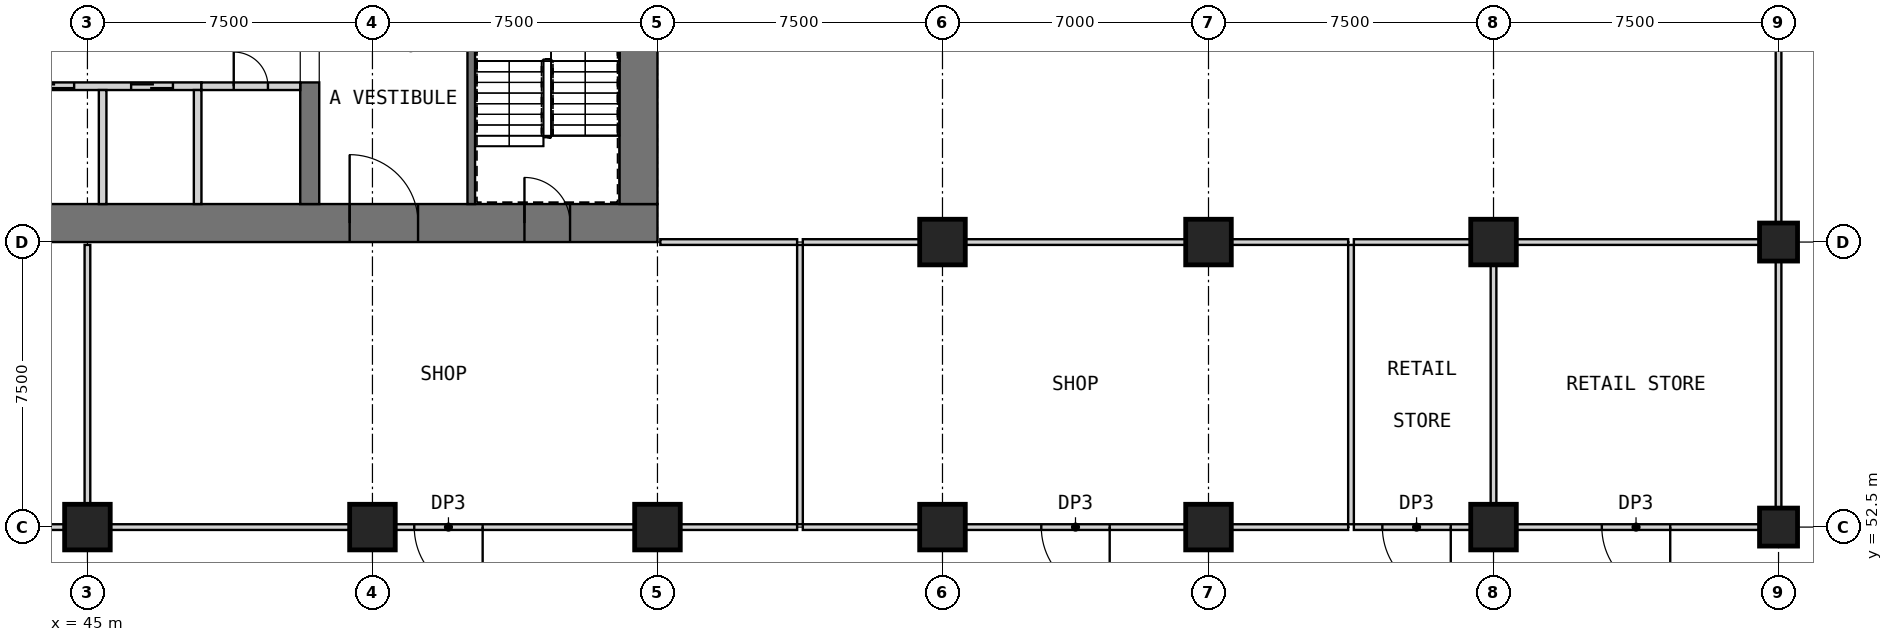
"""IFC4 building model, lengths in metres.
Left out: names, types, materials, properties, quantities, classifications, styles, units other than length and angle.
Written with IfcOpenShell. Run it as: python <this file> out.ifc"""

import sys

from ifc_helpers import new_model, si_unit, direction, frame, frame_2d, origin, origin_2d, place, context, subcontext, project, spatial, rectangle, extrude, element, fill, save


model = new_model("IFC4")
c1 = context("Model", 3, precision=1e-05, world=origin(), true_north=direction((0.0, 1.0)))
c2 = subcontext(c1, "Body", "Model", "MODEL_VIEW")
j1 = project(units=[si_unit("LENGTHUNIT", "METRE"), si_unit("PLANEANGLEUNIT", "RADIAN")], contexts=[c1])
p1 = place(None, origin())
s1 = spatial("IfcSite", under=j1, at=p1, CompositionType="ELEMENT")
p2 = place(p1, origin())
s2 = spatial("IfcBuilding", under=s1, at=p2, CompositionType="ELEMENT")
p3 = place(p2, frame((0.0, 0.0, 13.5)))
s3 = spatial("IfcBuildingStorey", under=s2, at=p3, CompositionType="ELEMENT", Elevation=13.5)
for number, where, z_axis, x_axis in (
    (1, (45.0, 52.5, 0.0), (0.0, 0.0, 1.0), (1.0, 0.0, 0.0)),
    (2, (52.5, 52.5, 0.0), (0.0, 0.0, 1.0), (1.0, 0.0, 0.0)),
    (3, (60.0, 52.5, 0.0), (0.0, 0.0, 1.0), (1.0, 0.0, 0.0)),
    (4, (67.5, 52.5, 0.0), (0.0, 0.0, 1.0), (1.0, 0.0, 0.0)),
    (5, (67.5, 60.0, 0.0), (0.0, 0.0, 1.0), (1.0, 0.0, 0.0)),
    (6, (74.5, 52.5, 0.0), (0.0, 0.0, 1.0), (1.0, 0.0, 0.0)),
    (7, (74.5, 60.0, 0.0), (0.0, 0.0, 1.0), (1.0, 0.0, 0.0)),
    (8, (82.0, 52.5, 0.0), (0.0, 0.0, 1.0), (1.0, 0.0, 0.0)),
    (9, (82.0, 60.0, 0.0), (0.0, 0.0, 1.0), (1.0, 0.0, 0.0)),
):
    element("IfcColumn", number, at=place(p3, frame(where, z_axis=z_axis, x_axis=x_axis)), inside=s3, PredefinedType="COLUMN", context=c2, shape_type="SweptSolid", body=[
        extrude(rectangle(XDim=1.2, YDim=1.2, at=origin_2d()), origin(), (0.0, 0.0, 1.0), 5.0),
    ])
for number, where, z_axis, x_axis in (
    (10, (89.5, 52.5, 0.0), (0.0, 0.0, 1.0), (1.0, 0.0, 0.0)),
    (11, (89.5, 60.0, 0.0), (0.0, 0.0, 1.0), (1.0, 0.0, 0.0)),
):
    element("IfcColumn", number, at=place(p3, frame(where, z_axis=z_axis, x_axis=x_axis)), inside=s3, PredefinedType="COLUMN", context=c2, shape_type="SweptSolid", body=[
        extrude(rectangle(XDim=1.0, YDim=1.0, at=origin_2d()), origin(), (0.0, 0.0, 1.0), 5.0),
    ])
p4 = place(p3, frame((30.0, 60.5, 0.0), z_axis=(0.0, 0.0, 1.0), x_axis=(1.0, 0.0, 0.0)))
e12 = element("IfcWall", 12, at=p4, inside=s3, PredefinedType="SHEAR", context=c2, shape_type="SweptSolid", body=[
    extrude(rectangle(XDim=30.0, YDim=1.0, at=frame_2d((15.0, 0.0))), origin(), (0.0, 0.0, 1.0), 5.0),
])
p5 = place(p4, frame((21.9, 0.0, 0.0)))
e13 = element("IfcOpeningElement", 13, at=p5, cuts=e12, PredefinedType="OPENING", context=c2, shape_type="SweptSolid", body=[
    extrude(rectangle(XDim=1.8, YDim=2.1, at=frame_2d((0.9, 1.05))), frame((0.0, 0.51, 0.0), z_axis=(0.0, -1.0, 0.0), x_axis=(1.0, 0.0, 0.0)), (0.0, 0.0, 1.0), 1.02),
])
p6 = place(p4, frame((26.5, 0.0, 0.0)))
e14 = element("IfcOpeningElement", 14, at=p6, cuts=e12, PredefinedType="OPENING", context=c2, shape_type="SweptSolid", body=[
    extrude(rectangle(XDim=1.2, YDim=2.1, at=frame_2d((0.6, 1.05))), frame((0.0, 0.51, 0.0), z_axis=(0.0, -1.0, 0.0), x_axis=(1.0, 0.0, 0.0)), (0.0, 0.0, 1.0), 1.02),
])
p7 = place(p3, frame((59.5, 61.0, 0.0), z_axis=(0.0, 0.0, 1.0), x_axis=(0.0, 1.0, 0.0)))
e15 = element("IfcWall", 15, at=p7, inside=s3, PredefinedType="SHEAR", context=c2, shape_type="SweptSolid", body=[
    extrude(rectangle(XDim=20.5, YDim=1.0, at=frame_2d((10.25, 0.0))), origin(), (0.0, 0.0, 1.0), 5.0),
])
p8 = place(p7, frame((14.5, 0.0, 0.0)))
e16 = element("IfcOpeningElement", 16, at=p8, cuts=e15, PredefinedType="OPENING", context=c2, shape_type="SweptSolid", body=[
    extrude(rectangle(XDim=1.8, YDim=2.1, at=frame_2d((0.9, 1.05))), frame((0.0, 0.51, 0.0), z_axis=(0.0, -1.0, 0.0), x_axis=(1.0, 0.0, 0.0)), (0.0, 0.0, 1.0), 1.02),
])
p9 = place(p3, frame((50.85, 61.0, 0.0), z_axis=(0.0, 0.0, 1.0), x_axis=(0.0, 1.0, 0.0)))
e17 = element("IfcWall", 17, at=p9, inside=s3, PredefinedType="SHEAR", context=c2, shape_type="SweptSolid", body=[
    extrude(rectangle(XDim=3.2, YDim=0.5, at=frame_2d((1.6, 0.0))), origin(), (0.0, 0.0, 1.0), 5.0),
])
p10 = place(p3, frame((35.0, 64.1, 0.0), z_axis=(0.0, 0.0, 1.0), x_axis=(1.0, 0.0, 0.0)))
e18 = element("IfcWall", 18, at=p10, inside=s3, PredefinedType="SOLIDWALL", context=c2, shape_type="SweptSolid", body=[
    extrude(rectangle(XDim=13.0, YDim=0.2, at=frame_2d((6.5, 0.0))), origin(), (0.0, 0.0, 1.0), 5.0),
])
p11 = place(p10, frame((0.75, 0.0, 0.0)))
e19 = element("IfcOpeningElement", 19, at=p11, cuts=e18, PredefinedType="OPENING", context=c2, shape_type="SweptSolid", body=[
    extrude(rectangle(XDim=1.1, YDim=2.1, at=frame_2d((0.55, 1.05))), frame((0.0, 0.11, 0.0), z_axis=(0.0, -1.0, 0.0), x_axis=(1.0, 0.0, 0.0)), (0.0, 0.0, 1.0), 0.22),
])
p12 = place(p10, frame((3.35, 0.0, 0.0)))
e20 = element("IfcOpeningElement", 20, at=p12, cuts=e18, PredefinedType="OPENING", context=c2, shape_type="SweptSolid", body=[
    extrude(rectangle(XDim=1.1, YDim=2.1, at=frame_2d((0.55, 1.05))), frame((0.0, 0.11, 0.0), z_axis=(0.0, -1.0, 0.0), x_axis=(1.0, 0.0, 0.0)), (0.0, 0.0, 1.0), 0.22),
])
p13 = place(p10, frame((5.95, 0.0, 0.0)))
e21 = element("IfcOpeningElement", 21, at=p13, cuts=e18, PredefinedType="OPENING", context=c2, shape_type="SweptSolid", body=[
    extrude(rectangle(XDim=1.1, YDim=2.1, at=frame_2d((0.55, 1.05))), frame((0.0, 0.11, 0.0), z_axis=(0.0, -1.0, 0.0), x_axis=(1.0, 0.0, 0.0)), (0.0, 0.0, 1.0), 0.22),
])
p14 = place(p10, frame((8.55, 0.0, 0.0)))
e22 = element("IfcOpeningElement", 22, at=p14, cuts=e18, PredefinedType="OPENING", context=c2, shape_type="SweptSolid", body=[
    extrude(rectangle(XDim=1.1, YDim=2.1, at=frame_2d((0.55, 1.05))), frame((0.0, 0.11, 0.0), z_axis=(0.0, -1.0, 0.0), x_axis=(1.0, 0.0, 0.0)), (0.0, 0.0, 1.0), 0.22),
])
p15 = place(p10, frame((11.15, 0.0, 0.0)))
e23 = element("IfcOpeningElement", 23, at=p15, cuts=e18, PredefinedType="OPENING", context=c2, shape_type="SweptSolid", body=[
    extrude(rectangle(XDim=1.1, YDim=2.1, at=frame_2d((0.55, 1.05))), frame((0.0, 0.11, 0.0), z_axis=(0.0, -1.0, 0.0), x_axis=(1.0, 0.0, 0.0)), (0.0, 0.0, 1.0), 0.22),
])
for number, where, z_axis, x_axis in (
    (24, (45.4, 61.0, 0.0), (0.0, 0.0, 1.0), (0.0, 1.0, 0.0)),
    (25, (47.9, 61.0, 0.0), (0.0, 0.0, 1.0), (0.0, 1.0, 0.0)),
):
    element("IfcWall", number, at=place(p3, frame(where, z_axis=z_axis, x_axis=x_axis)), inside=s3, PredefinedType="SOLIDWALL", context=c2, shape_type="SweptSolid", body=[
        extrude(rectangle(XDim=3.0, YDim=0.2, at=frame_2d((1.5, 0.0))), origin(), (0.0, 0.0, 1.0), 5.0),
    ])
p16 = place(p3, frame((48.0, 64.1, 0.0), z_axis=(0.0, 0.0, 1.0), x_axis=(1.0, 0.0, 0.0)))
e26 = element("IfcWall", 26, at=p16, inside=s3, PredefinedType="PARTITIONING", context=c2, shape_type="SweptSolid", body=[
    extrude(rectangle(XDim=2.6, YDim=0.2, at=frame_2d((1.3, 0.0))), origin(), (0.0, 0.0, 1.0), 4.7),
])
p17 = place(p16, frame((0.85, 0.0, 0.0)))
e27 = element("IfcOpeningElement", 27, at=p17, cuts=e26, PredefinedType="OPENING", context=c2, shape_type="SweptSolid", body=[
    extrude(rectangle(XDim=0.9, YDim=2.1, at=frame_2d((0.45, 1.05))), frame((0.0, 0.11, 0.0), z_axis=(0.0, -1.0, 0.0), x_axis=(1.0, 0.0, 0.0)), (0.0, 0.0, 1.0), 0.22),
])
p18 = place(p3, frame((55.1, 61.0, 0.0), z_axis=(0.0, 0.0, 1.0), x_axis=(0.0, 1.0, 0.0)))
e28 = element("IfcWall", 28, at=p18, inside=s3, PredefinedType="SOLIDWALL", context=c2, shape_type="SweptSolid", body=[
    extrude(rectangle(XDim=7.6, YDim=0.2, at=frame_2d((3.8, 0.0))), origin(), (0.0, 0.0, 1.0), 4.7),
])
p19 = place(p3, frame((44.4, 52.5, 0.0), z_axis=(0.0, 0.0, 1.0), x_axis=(-1.0, 0.0, 0.0)))
e29 = element("IfcWall", 29, at=p19, inside=s3, PredefinedType="PARTITIONING", context=c2, shape_type="SweptSolid", body=[
    extrude(rectangle(XDim=6.3, YDim=0.15, at=frame_2d((3.15, 0.0))), origin(), (0.0, 0.0, 1.0), 4.7),
])
p20 = place(p19, frame((2.25, 0.0, 0.0)))
e30 = element("IfcOpeningElement", 30, at=p20, cuts=e29, PredefinedType="OPENING", context=c2, shape_type="SweptSolid", body=[
    extrude(rectangle(XDim=1.8, YDim=2.4, at=frame_2d((0.9, 1.2))), frame((0.0, 0.085, 0.0), z_axis=(0.0, -1.0, 0.0), x_axis=(1.0, 0.0, 0.0)), (0.0, 0.0, 1.0), 0.17),
])
p21 = place(p3, frame((45.6, 52.5, 0.0), z_axis=(0.0, 0.0, 1.0), x_axis=(1.0, 0.0, 0.0)))
e31 = element("IfcWall", 31, at=p21, inside=s3, PredefinedType="PARTITIONING", context=c2, shape_type="SweptSolid", body=[
    extrude(rectangle(XDim=6.3, YDim=0.15, at=frame_2d((3.15, 0.0))), origin(), (0.0, 0.0, 1.0), 4.7),
])
p22 = place(p3, frame((59.4, 52.5, 0.0), z_axis=(0.0, 0.0, 1.0), x_axis=(-1.0, 0.0, 0.0)))
e32 = element("IfcWall", 32, at=p22, inside=s3, PredefinedType="PARTITIONING", context=c2, shape_type="SweptSolid", body=[
    extrude(rectangle(XDim=6.3, YDim=0.15, at=frame_2d((3.15, 0.0))), origin(), (0.0, 0.0, 1.0), 4.7),
])
p23 = place(p22, frame((4.0, 0.0, 0.0)))
e33 = element("IfcOpeningElement", 33, at=p23, cuts=e32, PredefinedType="OPENING", context=c2, shape_type="SweptSolid", body=[
    extrude(rectangle(XDim=1.8, YDim=2.4, at=frame_2d((0.9, 1.2))), frame((0.0, 0.085, 0.0), z_axis=(0.0, -1.0, 0.0), x_axis=(1.0, 0.0, 0.0)), (0.0, 0.0, 1.0), 0.17),
])
for number, where, z_axis, x_axis in (
    (34, (60.6, 52.5, 0.0), (0.0, 0.0, 1.0), (1.0, 0.0, 0.0)),
    (35, (63.825, 52.5, 0.0), (0.0, 0.0, 1.0), (1.0, 0.0, 0.0)),
):
    element("IfcWall", number, at=place(p3, frame(where, z_axis=z_axis, x_axis=x_axis)), inside=s3, PredefinedType="PARTITIONING", context=c2, shape_type="SweptSolid", body=[
        extrude(rectangle(XDim=3.075, YDim=0.15, at=frame_2d((1.538, 0.0))), origin(), (0.0, 0.0, 1.0), 4.7),
    ])
p24 = place(p3, frame((73.9, 52.5, 0.0), z_axis=(0.0, 0.0, 1.0), x_axis=(-1.0, 0.0, 0.0)))
e36 = element("IfcWall", 36, at=p24, inside=s3, PredefinedType="PARTITIONING", context=c2, shape_type="SweptSolid", body=[
    extrude(rectangle(XDim=5.8, YDim=0.15, at=frame_2d((2.9, 0.0))), origin(), (0.0, 0.0, 1.0), 4.7),
])
p25 = place(p24, frame((2.0, 0.0, 0.0)))
e37 = element("IfcOpeningElement", 37, at=p25, cuts=e36, PredefinedType="OPENING", context=c2, shape_type="SweptSolid", body=[
    extrude(rectangle(XDim=1.8, YDim=2.4, at=frame_2d((0.9, 1.2))), frame((0.0, 0.085, 0.0), z_axis=(0.0, -1.0, 0.0), x_axis=(1.0, 0.0, 0.0)), (0.0, 0.0, 1.0), 0.17),
])
p26 = place(p3, frame((75.1, 52.5, 0.0), z_axis=(0.0, 0.0, 1.0), x_axis=(1.0, 0.0, 0.0)))
e38 = element("IfcWall", 38, at=p26, inside=s3, PredefinedType="PARTITIONING", context=c2, shape_type="SweptSolid", body=[
    extrude(rectangle(XDim=3.075, YDim=0.15, at=frame_2d((1.538, 0.0))), origin(), (0.0, 0.0, 1.0), 4.7),
])
p27 = place(p3, frame((81.4, 52.5, 0.0), z_axis=(0.0, 0.0, 1.0), x_axis=(-1.0, 0.0, 0.0)))
e39 = element("IfcWall", 39, at=p27, inside=s3, PredefinedType="PARTITIONING", context=c2, shape_type="SweptSolid", body=[
    extrude(rectangle(XDim=3.075, YDim=0.15, at=frame_2d((1.538, 0.0))), origin(), (0.0, 0.0, 1.0), 4.7),
])
p28 = place(p27, frame((0.525, 0.0, 0.0)))
e40 = element("IfcOpeningElement", 40, at=p28, cuts=e39, PredefinedType="OPENING", context=c2, shape_type="SweptSolid", body=[
    extrude(rectangle(XDim=1.8, YDim=2.4, at=frame_2d((0.9, 1.2))), frame((0.0, 0.085, 0.0), z_axis=(0.0, -1.0, 0.0), x_axis=(1.0, 0.0, 0.0)), (0.0, 0.0, 1.0), 0.17),
])
p29 = place(p3, frame((89.0, 52.5, 0.0), z_axis=(0.0, 0.0, 1.0), x_axis=(-1.0, 0.0, 0.0)))
e41 = element("IfcWall", 41, at=p29, inside=s3, PredefinedType="PARTITIONING", context=c2, shape_type="SweptSolid", body=[
    extrude(rectangle(XDim=6.4, YDim=0.15, at=frame_2d((3.2, 0.0))), origin(), (0.0, 0.0, 1.0), 4.7),
])
p30 = place(p29, frame((2.35, 0.0, 0.0)))
e42 = element("IfcOpeningElement", 42, at=p30, cuts=e41, PredefinedType="OPENING", context=c2, shape_type="SweptSolid", body=[
    extrude(rectangle(XDim=1.8, YDim=2.4, at=frame_2d((0.9, 1.2))), frame((0.0, 0.085, 0.0), z_axis=(0.0, -1.0, 0.0), x_axis=(1.0, 0.0, 0.0)), (0.0, 0.0, 1.0), 0.17),
])
p31 = place(p3, frame((60.075, 60.0, 0.0), z_axis=(0.0, 0.0, 1.0), x_axis=(1.0, 0.0, 0.0)))
e43 = element("IfcWall", 43, at=p31, inside=s3, PredefinedType="PARTITIONING", context=c2, shape_type="SweptSolid", body=[
    extrude(rectangle(XDim=3.6, YDim=0.15, at=frame_2d((1.8, 0.0))), origin(), (0.0, 0.0, 1.0), 4.7),
])
p32 = place(p3, frame((63.825, 60.0, 0.0), z_axis=(0.0, 0.0, 1.0), x_axis=(1.0, 0.0, 0.0)))
e44 = element("IfcWall", 44, at=p32, inside=s3, PredefinedType="PARTITIONING", context=c2, shape_type="SweptSolid", body=[
    extrude(rectangle(XDim=3.075, YDim=0.15, at=frame_2d((1.538, 0.0))), origin(), (0.0, 0.0, 1.0), 4.7),
])
p33 = place(p3, frame((68.1, 60.0, 0.0), z_axis=(0.0, 0.0, 1.0), x_axis=(1.0, 0.0, 0.0)))
e45 = element("IfcWall", 45, at=p33, inside=s3, PredefinedType="PARTITIONING", context=c2, shape_type="SweptSolid", body=[
    extrude(rectangle(XDim=5.8, YDim=0.15, at=frame_2d((2.9, 0.0))), origin(), (0.0, 0.0, 1.0), 4.7),
])
for number, where, z_axis, x_axis in (
    (46, (75.1, 60.0, 0.0), (0.0, 0.0, 1.0), (1.0, 0.0, 0.0)),
    (47, (78.325, 60.0, 0.0), (0.0, 0.0, 1.0), (1.0, 0.0, 0.0)),
):
    element("IfcWall", number, at=place(p3, frame(where, z_axis=z_axis, x_axis=x_axis)), inside=s3, PredefinedType="PARTITIONING", context=c2, shape_type="SweptSolid", body=[
        extrude(rectangle(XDim=3.075, YDim=0.15, at=frame_2d((1.538, 0.0))), origin(), (0.0, 0.0, 1.0), 4.7),
    ])
p34 = place(p3, frame((82.6, 60.0, 0.0), z_axis=(0.0, 0.0, 1.0), x_axis=(1.0, 0.0, 0.0)))
e48 = element("IfcWall", 48, at=p34, inside=s3, PredefinedType="PARTITIONING", context=c2, shape_type="SweptSolid", body=[
    extrude(rectangle(XDim=6.4, YDim=0.15, at=frame_2d((3.2, 0.0))), origin(), (0.0, 0.0, 1.0), 4.7),
])
p35 = place(p3, frame((45.0, 53.1, 0.0), z_axis=(0.0, 0.0, 1.0), x_axis=(0.0, 1.0, 0.0)))
e49 = element("IfcWall", 49, at=p35, inside=s3, PredefinedType="PARTITIONING", context=c2, shape_type="SweptSolid", body=[
    extrude(rectangle(XDim=6.825, YDim=0.15, at=frame_2d((3.413, 0.0))), origin(), (0.0, 0.0, 1.0), 4.7),
])
p36 = place(p3, frame((78.25, 52.575, 0.0), z_axis=(0.0, 0.0, 1.0), x_axis=(0.0, 1.0, 0.0)))
e50 = element("IfcWall", 50, at=p36, inside=s3, PredefinedType="PARTITIONING", context=c2, shape_type="SweptSolid", body=[
    extrude(rectangle(XDim=7.35, YDim=0.15, at=frame_2d((3.675, 0.0))), origin(), (0.0, 0.0, 1.0), 4.7),
])
for number, where, z_axis, x_axis in (
    (51, (89.5, 53.0, 0.0), (0.0, 0.0, 1.0), (0.0, 1.0, 0.0)),
    (52, (89.5, 60.5, 0.0), (0.0, 0.0, 1.0), (0.0, 1.0, 0.0)),
):
    element("IfcWall", number, at=place(p3, frame(where, z_axis=z_axis, x_axis=x_axis)), inside=s3, PredefinedType="PARTITIONING", context=c2, shape_type="SweptSolid", body=[
        extrude(rectangle(XDim=6.5, YDim=0.15, at=frame_2d((3.25, 0.0))), origin(), (0.0, 0.0, 1.0), 4.7),
    ])
p37 = place(p3, frame((63.75, 52.575, 0.0), z_axis=(0.0, 0.0, 1.0), x_axis=(0.0, 1.0, 0.0)))
e53 = element("IfcWall", 53, at=p37, inside=s3, PredefinedType="PARTITIONING", context=c2, shape_type="SweptSolid", body=[
    extrude(rectangle(XDim=7.35, YDim=0.15, at=frame_2d((3.675, 0.0))), origin(), (0.0, 0.0, 1.0), 4.7),
])
p38 = place(p3, frame((82.0, 53.1, 0.0), z_axis=(0.0, 0.0, 1.0), x_axis=(0.0, 1.0, 0.0)))
e54 = element("IfcWall", 54, at=p38, inside=s3, PredefinedType="PARTITIONING", context=c2, shape_type="SweptSolid", body=[
    extrude(rectangle(XDim=6.3, YDim=0.15, at=frame_2d((3.15, 0.0))), origin(), (0.0, 0.0, 1.0), 4.7),
])
p39 = place(p14, origin())
e55 = element("IfcDoor", 55, at=p39, inside=s3, OperationType="DOUBLE_DOOR_SLIDING", PredefinedType="DOOR", context=c2, shape_type="SweptSolid", body=[
    extrude(rectangle(XDim=1.1, YDim=2.1, at=frame_2d((0.55, 1.05))), frame((0.0, 0.025, 0.0), z_axis=(0.0, -1.0, 0.0), x_axis=(1.0, 0.0, 0.0)), (0.0, 0.0, 1.0), 0.05),
])
fill(e22, e55)
p40 = place(p15, origin())
e56 = element("IfcDoor", 56, at=p40, inside=s3, OperationType="DOUBLE_DOOR_SLIDING", PredefinedType="DOOR", context=c2, shape_type="SweptSolid", body=[
    extrude(rectangle(XDim=1.1, YDim=2.1, at=frame_2d((0.55, 1.05))), frame((0.0, 0.025, 0.0), z_axis=(0.0, -1.0, 0.0), x_axis=(1.0, 0.0, 0.0)), (0.0, 0.0, 1.0), 0.05),
])
fill(e23, e56)
p41 = place(p17, origin())
e57 = element("IfcDoor", 57, at=p41, inside=s3, OperationType="SINGLE_SWING_RIGHT", PredefinedType="DOOR", context=c2, shape_type="SweptSolid", body=[
    extrude(rectangle(XDim=0.9, YDim=2.1, at=frame_2d((0.45, 1.05))), frame((0.0, 0.025, 0.0), z_axis=(0.0, -1.0, 0.0), x_axis=(1.0, 0.0, 0.0)), (0.0, 0.0, 1.0), 0.05),
])
fill(e27, e57)
p42 = place(p5, origin())
e58 = element("IfcDoor", 58, at=p42, inside=s3, OperationType="DOUBLE_DOOR_SINGLE_SWING", PredefinedType="DOOR", context=c2, shape_type="SweptSolid", body=[
    extrude(rectangle(XDim=1.8, YDim=2.1, at=frame_2d((0.9, 1.05))), frame((0.0, 0.025, 0.0), z_axis=(0.0, -1.0, 0.0), x_axis=(1.0, 0.0, 0.0)), (0.0, 0.0, 1.0), 0.05),
])
fill(e13, e58)
p43 = place(p6, origin())
e59 = element("IfcDoor", 59, at=p43, inside=s3, OperationType="SINGLE_SWING_LEFT", PredefinedType="DOOR", context=c2, shape_type="SweptSolid", body=[
    extrude(rectangle(XDim=1.2, YDim=2.1, at=frame_2d((0.6, 1.05))), frame((0.0, 0.025, 0.0), z_axis=(0.0, -1.0, 0.0), x_axis=(1.0, 0.0, 0.0)), (0.0, 0.0, 1.0), 0.05),
])
fill(e14, e59)
p44 = place(p23, origin())
e60 = element("IfcDoor", 60, at=p44, inside=s3, OperationType="SINGLE_SWING_LEFT", PredefinedType="DOOR", context=c2, shape_type="SweptSolid", body=[
    extrude(rectangle(XDim=1.8, YDim=2.4, at=frame_2d((0.9, 1.2))), frame((0.0, 0.025, 0.0), z_axis=(0.0, -1.0, 0.0), x_axis=(1.0, 0.0, 0.0)), (0.0, 0.0, 1.0), 0.05),
])
fill(e33, e60)
p45 = place(p25, origin())
e61 = element("IfcDoor", 61, at=p45, inside=s3, OperationType="SINGLE_SWING_LEFT", PredefinedType="DOOR", context=c2, shape_type="SweptSolid", body=[
    extrude(rectangle(XDim=1.8, YDim=2.4, at=frame_2d((0.9, 1.2))), frame((0.0, 0.025, 0.0), z_axis=(0.0, -1.0, 0.0), x_axis=(1.0, 0.0, 0.0)), (0.0, 0.0, 1.0), 0.05),
])
fill(e37, e61)
p46 = place(p28, origin())
e62 = element("IfcDoor", 62, at=p46, inside=s3, OperationType="SINGLE_SWING_LEFT", PredefinedType="DOOR", context=c2, shape_type="SweptSolid", body=[
    extrude(rectangle(XDim=1.8, YDim=2.4, at=frame_2d((0.9, 1.2))), frame((0.0, 0.025, 0.0), z_axis=(0.0, -1.0, 0.0), x_axis=(1.0, 0.0, 0.0)), (0.0, 0.0, 1.0), 0.05),
])
fill(e40, e62)
p47 = place(p30, origin())
e63 = element("IfcDoor", 63, at=p47, inside=s3, OperationType="SINGLE_SWING_LEFT", PredefinedType="DOOR", context=c2, shape_type="SweptSolid", body=[
    extrude(rectangle(XDim=1.8, YDim=2.4, at=frame_2d((0.9, 1.2))), frame((0.0, 0.025, 0.0), z_axis=(0.0, -1.0, 0.0), x_axis=(1.0, 0.0, 0.0)), (0.0, 0.0, 1.0), 0.05),
])
fill(e42, e63)
save(model, sys.argv[1])
